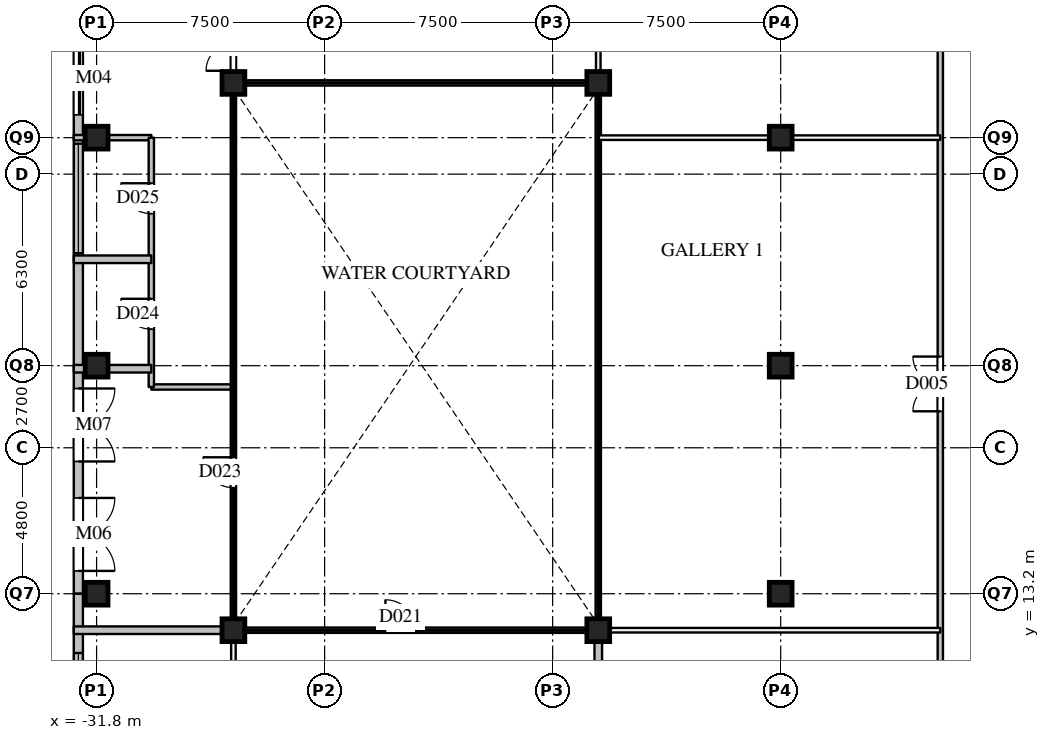
"""IFC4 building model, lengths in metres.
Left out: names, types, materials, properties, quantities, classifications, styles, units other than length and angle.
Written with IfcOpenShell. Run it as: python <this file> out.ifc"""

import sys

from ifc_helpers import new_model, si_unit, direction, frame, frame_2d, origin, origin_2d, place, context, subcontext, project, spatial, rectangle, extrude, element, fill, save


model = new_model("IFC4")
c1 = context("Model", 3, precision=1e-05, world=origin(), true_north=direction((0.0, 1.0)))
c2 = subcontext(c1, "Body", "Model", "MODEL_VIEW")
j1 = project(units=[si_unit("LENGTHUNIT", "METRE"), si_unit("PLANEANGLEUNIT", "RADIAN")], contexts=[c1])
p1 = place(None, origin())
s1 = spatial("IfcSite", under=j1, at=p1, CompositionType="ELEMENT")
p2 = place(p1, origin())
s2 = spatial("IfcBuilding", under=s1, at=p2, CompositionType="ELEMENT")
p3 = place(p2, origin())
s3 = spatial("IfcBuildingStorey", under=s2, at=p3, CompositionType="ELEMENT", Elevation=0.0)
for number, where, z_axis, x_axis in (
    (1, (-31.8, 13.2, 0.0), (0.0, 0.0, 1.0), (1.0, 0.0, 0.0)),
    (2, (-31.8, 20.7, 0.0), (0.0, 0.0, 1.0), (1.0, 0.0, 0.0)),
    (3, (-31.8, 28.2, 0.0), (0.0, 0.0, 1.0), (1.0, 0.0, 0.0)),
    (4, (-9.3, 13.2, 0.0), (0.0, 0.0, 1.0), (1.0, 0.0, 0.0)),
    (5, (-9.3, 20.7, 0.0), (0.0, 0.0, 1.0), (1.0, 0.0, 0.0)),
    (6, (-9.3, 28.2, 0.0), (0.0, 0.0, 1.0), (1.0, 0.0, 0.0)),
    (7, (-27.3, 12.0, 0.0), (0.0, 0.0, 1.0), (1.0, 0.0, 0.0)),
    (8, (-15.3, 12.0, 0.0), (0.0, 0.0, 1.0), (1.0, 0.0, 0.0)),
    (9, (-15.3, 30.0, 0.0), (0.0, 0.0, 1.0), (1.0, 0.0, 0.0)),
    (10, (-27.3, 30.0, 0.0), (0.0, 0.0, 1.0), (1.0, 0.0, 0.0)),
):
    element("IfcColumn", number, at=place(p3, frame(where, z_axis=z_axis, x_axis=x_axis)), inside=s3, PredefinedType="COLUMN", context=c2, shape_type="SweptSolid", body=[
        extrude(rectangle(XDim=0.75, YDim=0.75, at=origin_2d()), origin(), (0.0, 0.0, 1.0), 8.0),
    ])
p4 = place(p3, frame((-32.4, 35.7, 0.0), z_axis=(0.0, 0.0, 1.0), x_axis=(0.0, -1.0, 0.0)))
e11 = element("IfcWall", 11, at=p4, inside=s3, PredefinedType="SOLIDWALL", context=c2, shape_type="SweptSolid", body=[
    extrude(rectangle(XDim=7.5, YDim=0.3, at=frame_2d((3.75, 0.0))), origin(), (0.0, 0.0, 1.0), 7.59),
])
p5 = place(p4, frame((4.35, 0.0, 0.0)))
e12 = element("IfcOpeningElement", 12, at=p5, cuts=e11, PredefinedType="OPENING", context=c2, shape_type="SweptSolid", body=[
    extrude(rectangle(XDim=2.4, YDim=2.4, at=frame_2d((1.2, 1.2))), frame((0.0, 0.16, 0.0), z_axis=(0.0, -1.0, 0.0), x_axis=(1.0, 0.0, 0.0)), (0.0, 0.0, 1.0), 0.32),
])
p6 = place(p4, frame((0.75, 0.0, 0.0)))
e13 = element("IfcOpeningElement", 13, at=p6, cuts=e11, PredefinedType="OPENING", context=c2, shape_type="SweptSolid", body=[
    extrude(rectangle(XDim=2.4, YDim=2.4, at=frame_2d((1.2, 1.2))), frame((0.0, 0.16, 0.0), z_axis=(0.0, -1.0, 0.0), x_axis=(1.0, 0.0, 0.0)), (0.0, 0.0, 1.0), 0.32),
])
p7 = place(p3, frame((-32.4, 28.2, 0.0), z_axis=(0.0, 0.0, 1.0), x_axis=(0.0, -1.0, 0.0)))
e14 = element("IfcWall", 14, at=p7, inside=s3, PredefinedType="SOLIDWALL", context=c2, shape_type="SweptSolid", body=[
    extrude(rectangle(XDim=7.5, YDim=0.3, at=frame_2d((3.75, 0.0))), origin(), (0.0, 0.0, 1.0), 7.59),
])
p8 = place(p7, frame((0.2, 0.0, 0.9)))
e15 = element("IfcOpeningElement", 15, at=p8, cuts=e14, PredefinedType="OPENING", context=c2, shape_type="SweptSolid", body=[
    extrude(rectangle(XDim=3.6, YDim=3.0, at=frame_2d((1.8, 1.5))), frame((0.0, 0.16, 0.0), z_axis=(0.0, -1.0, 0.0), x_axis=(1.0, 0.0, 0.0)), (0.0, 0.0, 1.0), 0.32),
])
p9 = place(p3, frame((-32.4, 20.7, 0.0), z_axis=(0.0, 0.0, 1.0), x_axis=(0.0, -1.0, 0.0)))
e16 = element("IfcWall", 16, at=p9, inside=s3, PredefinedType="SOLIDWALL", context=c2, shape_type="SweptSolid", body=[
    extrude(rectangle(XDim=7.5, YDim=0.3, at=frame_2d((3.75, 0.0))), origin(), (0.0, 0.0, 1.0), 7.59),
])
p10 = place(p9, frame((4.35, 0.0, 0.0)))
e17 = element("IfcOpeningElement", 17, at=p10, cuts=e16, PredefinedType="OPENING", context=c2, shape_type="SweptSolid", body=[
    extrude(rectangle(XDim=2.4, YDim=2.7, at=frame_2d((1.2, 1.35))), frame((0.0, 0.16, 0.0), z_axis=(0.0, -1.0, 0.0), x_axis=(1.0, 0.0, 0.0)), (0.0, 0.0, 1.0), 0.32),
])
p11 = place(p9, frame((0.75, 0.0, 0.0)))
e18 = element("IfcOpeningElement", 18, at=p11, cuts=e16, PredefinedType="OPENING", context=c2, shape_type="SweptSolid", body=[
    extrude(rectangle(XDim=2.4, YDim=2.7, at=frame_2d((1.2, 1.35))), frame((0.0, 0.16, 0.0), z_axis=(0.0, -1.0, 0.0), x_axis=(1.0, 0.0, 0.0)), (0.0, 0.0, 1.0), 0.32),
])
p12 = place(p3, frame((-32.4, 13.2, 0.0), z_axis=(0.0, 0.0, 1.0), x_axis=(0.0, -1.0, 0.0)))
e19 = element("IfcWall", 19, at=p12, inside=s3, PredefinedType="SOLIDWALL", context=c2, shape_type="SweptSolid", body=[
    extrude(rectangle(XDim=7.5, YDim=0.3, at=frame_2d((3.75, 0.0))), origin(), (0.0, 0.0, 1.0), 7.59),
])
p13 = place(p12, frame((1.95, 0.0, 0.9)))
e20 = element("IfcOpeningElement", 20, at=p13, cuts=e19, PredefinedType="OPENING", context=c2, shape_type="SweptSolid", body=[
    extrude(rectangle(XDim=3.6, YDim=3.0, at=frame_2d((1.8, 1.5))), frame((0.0, 0.16, 0.0), z_axis=(0.0, -1.0, 0.0), x_axis=(1.0, 0.0, 0.0)), (0.0, 0.0, 1.0), 0.32),
])
p14 = place(p3, frame((-27.3, 12.0, 0.0), z_axis=(0.0, 0.0, 1.0), x_axis=(1.0, 0.0, 0.0)))
e21 = element("IfcWall", 21, at=p14, inside=s3, PredefinedType="PARTITIONING", context=c2, shape_type="SweptSolid", body=[
    extrude(rectangle(XDim=12.0, YDim=0.175, at=frame_2d((6.0, 0.0))), origin(), (0.0, 0.0, 1.0), 7.59),
])
p15 = place(p14, frame((5.0, 0.0, 0.0)))
e22 = element("IfcOpeningElement", 22, at=p15, cuts=e21, PredefinedType="OPENING", context=c2, shape_type="SweptSolid", body=[
    extrude(rectangle(XDim=1.0, YDim=2.1, at=frame_2d((0.5, 1.05))), frame((0.0, 0.097, 0.0), z_axis=(0.0, -1.0, 0.0), x_axis=(1.0, 0.0, 0.0)), (0.0, 0.0, 1.0), 0.195),
])
p16 = place(p3, frame((-30.0, 20.0, 0.0), z_axis=(0.0, 0.0, 1.0), x_axis=(1.0, 0.0, 0.0)))
e23 = element("IfcWall", 23, at=p16, inside=s3, PredefinedType="PARTITIONING", context=c2, shape_type="SweptSolid", body=[
    extrude(rectangle(XDim=2.7, YDim=0.175, at=frame_2d((1.35, 0.0))), origin(), (0.0, 0.0, 1.0), 7.59),
])
p17 = place(p3, frame((-32.55, 28.2, 0.0), z_axis=(0.0, 0.0, 1.0), x_axis=(1.0, 0.0, 0.0)))
e24 = element("IfcWall", 24, at=p17, inside=s3, PredefinedType="PARTITIONING", context=c2, shape_type="SweptSolid", body=[
    extrude(rectangle(XDim=2.55, YDim=0.175, at=frame_2d((1.275, 0.0))), origin(), (0.0, 0.0, 1.0), 7.59),
])
p18 = place(p3, frame((-27.3, 30.0, 0.0), z_axis=(0.0, 0.0, 1.0), x_axis=(1.0, 0.0, 0.0)))
e25 = element("IfcWall", 25, at=p18, inside=s3, PredefinedType="PARTITIONING", context=c2, shape_type="SweptSolid", body=[
    extrude(rectangle(XDim=12.0, YDim=0.175, at=frame_2d((6.0, 0.0))), origin(), (0.0, 0.0, 1.0), 7.59),
])
p19 = place(p3, frame((-30.0, 20.0, 0.0), z_axis=(0.0, 0.0, 1.0), x_axis=(0.0, 1.0, 0.0)))
e26 = element("IfcWall", 26, at=p19, inside=s3, PredefinedType="PARTITIONING", context=c2, shape_type="SweptSolid", body=[
    extrude(rectangle(XDim=8.2, YDim=0.175, at=frame_2d((4.1, 0.0))), origin(), (0.0, 0.0, 1.0), 7.59),
])
p20 = place(p19, frame((1.9, 0.0, 0.0)))
e27 = element("IfcOpeningElement", 27, at=p20, cuts=e26, PredefinedType="OPENING", context=c2, shape_type="SweptSolid", body=[
    extrude(rectangle(XDim=1.0, YDim=2.1, at=frame_2d((0.5, 1.05))), frame((0.0, 0.097, 0.0), z_axis=(0.0, -1.0, 0.0), x_axis=(1.0, 0.0, 0.0)), (0.0, 0.0, 1.0), 0.195),
])
p21 = place(p19, frame((5.7, 0.0, 0.0)))
e28 = element("IfcOpeningElement", 28, at=p21, cuts=e26, PredefinedType="OPENING", context=c2, shape_type="SweptSolid", body=[
    extrude(rectangle(XDim=1.0, YDim=2.1, at=frame_2d((0.5, 1.05))), frame((0.0, 0.097, 0.0), z_axis=(0.0, -1.0, 0.0), x_axis=(1.0, 0.0, 0.0)), (0.0, 0.0, 1.0), 0.195),
])
p22 = place(p3, frame((-27.3, 12.0, 0.0), z_axis=(0.0, 0.0, 1.0), x_axis=(0.0, 1.0, 0.0)))
e29 = element("IfcWall", 29, at=p22, inside=s3, PredefinedType="PARTITIONING", context=c2, shape_type="SweptSolid", body=[
    extrude(rectangle(XDim=35.35, YDim=0.175, at=frame_2d((17.675, 0.0))), origin(), (0.0, 0.0, 1.0), 6.79),
])
p23 = place(p22, frame((18.4, 0.0, 0.0)))
e30 = element("IfcOpeningElement", 30, at=p23, cuts=e29, PredefinedType="OPENING", context=c2, shape_type="SweptSolid", body=[
    extrude(rectangle(XDim=1.8, YDim=2.1, at=frame_2d((0.9, 1.05))), frame((0.0, 0.097, 0.0), z_axis=(0.0, -1.0, 0.0), x_axis=(1.0, 0.0, 0.0)), (0.0, 0.0, 1.0), 0.195),
])
p24 = place(p22, frame((23.7, 0.0, 0.0)))
e31 = element("IfcOpeningElement", 31, at=p24, cuts=e29, PredefinedType="OPENING", context=c2, shape_type="SweptSolid", body=[
    extrude(rectangle(XDim=1.8, YDim=2.1, at=frame_2d((0.9, 1.05))), frame((0.0, 0.097, 0.0), z_axis=(0.0, -1.0, 0.0), x_axis=(1.0, 0.0, 0.0)), (0.0, 0.0, 1.0), 0.195),
])
p25 = place(p22, frame((4.688, 0.0, 0.0)))
e32 = element("IfcOpeningElement", 32, at=p25, cuts=e29, PredefinedType="OPENING", context=c2, shape_type="SweptSolid", body=[
    extrude(rectangle(XDim=1.0, YDim=2.1, at=frame_2d((0.5, 1.05))), frame((0.0, 0.097, 0.0), z_axis=(0.0, -1.0, 0.0), x_axis=(1.0, 0.0, 0.0)), (0.0, 0.0, 1.0), 0.195),
])
p26 = place(p3, frame((-15.3, 12.0, 0.0), z_axis=(0.0, 0.0, 1.0), x_axis=(0.0, 1.0, 0.0)))
e33 = element("IfcWall", 33, at=p26, inside=s3, PredefinedType="PARTITIONING", context=c2, shape_type="SweptSolid", body=[
    extrude(rectangle(XDim=18.0, YDim=0.175, at=frame_2d((9.0, 0.0))), origin(), (0.0, 0.0, 1.0), 7.59),
])
p27 = place(p3, frame((-4.05, -4.05, 0.0), z_axis=(0.0, 0.0, 1.0), x_axis=(0.0, 1.0, 0.0)))
e34 = element("IfcWall", 34, at=p27, inside=s3, PredefinedType="PARTITIONING", context=c2, shape_type="SweptSolid", body=[
    extrude(rectangle(XDim=63.0, YDim=0.175, at=frame_2d((31.5, 0.0))), origin(), (0.0, 0.0, 1.0), 6.79),
])
p28 = place(p27, frame((51.535, 0.0, 0.0)))
e35 = element("IfcOpeningElement", 35, at=p28, cuts=e34, PredefinedType="OPENING", context=c2, shape_type="SweptSolid", body=[
    extrude(rectangle(XDim=1.8, YDim=2.1, at=frame_2d((0.9, 1.05))), frame((0.0, 0.097, 0.0), z_axis=(0.0, -1.0, 0.0), x_axis=(1.0, 0.0, 0.0)), (0.0, 0.0, 1.0), 0.195),
])
p29 = place(p27, frame((23.25, 0.0, 0.0)))
e36 = element("IfcOpeningElement", 36, at=p29, cuts=e34, PredefinedType="OPENING", context=c2, shape_type="SweptSolid", body=[
    extrude(rectangle(XDim=1.8, YDim=2.1, at=frame_2d((0.9, 1.05))), frame((0.0, 0.097, 0.0), z_axis=(0.0, -1.0, 0.0), x_axis=(1.0, 0.0, 0.0)), (0.0, 0.0, 1.0), 0.195),
])
p30 = place(p27, frame((38.85, 0.0, 0.0)))
e37 = element("IfcOpeningElement", 37, at=p30, cuts=e34, PredefinedType="OPENING", context=c2, shape_type="SweptSolid", body=[
    extrude(rectangle(XDim=1.8, YDim=2.1, at=frame_2d((0.9, 1.05))), frame((0.0, 0.097, 0.0), z_axis=(0.0, -1.0, 0.0), x_axis=(1.0, 0.0, 0.0)), (0.0, 0.0, 1.0), 0.195),
])
p31 = place(p27, frame((8.625, 0.0, 0.0)))
e38 = element("IfcOpeningElement", 38, at=p31, cuts=e34, PredefinedType="OPENING", context=c2, shape_type="SweptSolid", body=[
    extrude(rectangle(XDim=1.8, YDim=2.1, at=frame_2d((0.9, 1.05))), frame((0.0, 0.097, 0.0), z_axis=(0.0, -1.0, 0.0), x_axis=(1.0, 0.0, 0.0)), (0.0, 0.0, 1.0), 0.195),
])
for number, where, z_axis, x_axis in (
    (39, (-15.3, 12.0, 0.0), (0.0, 0.0, 1.0), (1.0, 0.0, 0.0)),
    (40, (-15.3, 28.2, 0.0), (0.0, 0.0, 1.0), (1.0, 0.0, 0.0)),
):
    element("IfcWall", number, at=place(p3, frame(where, z_axis=z_axis, x_axis=x_axis)), inside=s3, PredefinedType="PARTITIONING", context=c2, shape_type="SweptSolid", body=[
        extrude(rectangle(XDim=11.25, YDim=0.15, at=frame_2d((5.625, 0.0))), origin(), (0.0, 0.0, 1.0), 6.79),
    ])
p32 = place(p3, frame((-27.3, -9.3, 0.0), z_axis=(0.0, 0.0, 1.0), x_axis=(0.0, 1.0, 0.0)))
e41 = element("IfcWall", 41, at=p32, inside=s3, PredefinedType="PARTITIONING", context=c2, shape_type="SweptSolid", body=[
    extrude(rectangle(XDim=21.3, YDim=0.15, at=frame_2d((10.65, 0.0))), origin(), (0.0, 0.0, 1.0), 6.79),
])
p33 = place(p3, frame((-15.3, 30.0, 0.0), z_axis=(0.0, 0.0, 1.0), x_axis=(0.0, 1.0, 0.0)))
e42 = element("IfcWall", 42, at=p33, inside=s3, PredefinedType="PARTITIONING", context=c2, shape_type="SweptSolid", body=[
    extrude(rectangle(XDim=13.2, YDim=0.15, at=frame_2d((6.6, 0.0))), origin(), (0.0, 0.0, 1.0), 6.79),
])
p34 = place(p33, frame((3.52, 0.0, 0.0)))
e43 = element("IfcOpeningElement", 43, at=p34, cuts=e42, PredefinedType="OPENING", context=c2, shape_type="SweptSolid", body=[
    extrude(rectangle(XDim=1.8, YDim=2.1, at=frame_2d((0.9, 1.05))), frame((0.0, 0.085, 0.0), z_axis=(0.0, -1.0, 0.0), x_axis=(1.0, 0.0, 0.0)), (0.0, 0.0, 1.0), 0.17),
])
p35 = place(p3, frame((-32.55, 12.0, 0.0), z_axis=(0.0, 0.0, 1.0), x_axis=(1.0, 0.0, 0.0)))
e44 = element("IfcWall", 44, at=p35, inside=s3, PredefinedType="PARTITIONING", context=c2, shape_type="SweptSolid", body=[
    extrude(rectangle(XDim=5.25, YDim=0.25, at=frame_2d((2.625, 0.0))), origin(), (0.0, 0.0, 1.0), 6.79),
])
p36 = place(p3, frame((-32.55, 20.6, 0.0), z_axis=(0.0, 0.0, 1.0), x_axis=(1.0, 0.0, 0.0)))
e45 = element("IfcWall", 45, at=p36, inside=s3, PredefinedType="PARTITIONING", context=c2, shape_type="SweptSolid", body=[
    extrude(rectangle(XDim=2.55, YDim=0.25, at=frame_2d((1.275, 0.0))), origin(), (0.0, 0.0, 1.0), 7.59),
])
p37 = place(p3, frame((-32.55, 24.2, 0.0), z_axis=(0.0, 0.0, 1.0), x_axis=(1.0, 0.0, 0.0)))
e46 = element("IfcWall", 46, at=p37, inside=s3, PredefinedType="PARTITIONING", context=c2, shape_type="SweptSolid", body=[
    extrude(rectangle(XDim=2.55, YDim=0.25, at=frame_2d((1.275, 0.0))), origin(), (0.0, 0.0, 1.0), 6.79),
])
p38 = place(p3, frame((-15.3, -9.3, 0.0), z_axis=(0.0, 0.0, 1.0), x_axis=(0.0, 1.0, 0.0)))
e47 = element("IfcWall", 47, at=p38, inside=s3, PredefinedType="PARTITIONING", context=c2, shape_type="SweptSolid", body=[
    extrude(rectangle(XDim=21.3, YDim=0.25, at=frame_2d((10.65, 0.0))), origin(), (0.0, 0.0, 1.0), 6.79),
])
p39 = place(p5, origin())
e48 = element("IfcDoor", 48, at=p39, inside=s3, OperationType="SLIDING_TO_LEFT", PredefinedType="DOOR", context=c2, shape_type="SweptSolid", body=[
    extrude(rectangle(XDim=2.4, YDim=2.4, at=frame_2d((1.2, 1.2))), frame((0.0, 0.025, 0.0), z_axis=(0.0, -1.0, 0.0), x_axis=(1.0, 0.0, 0.0)), (0.0, 0.0, 1.0), 0.05),
])
fill(e12, e48)
p40 = place(p8, origin())
e49 = element("IfcWindow", 49, at=p40, inside=s3, PartitioningType="SINGLE_PANEL", PredefinedType="WINDOW", context=c2, shape_type="SweptSolid", body=[
    extrude(rectangle(XDim=3.6, YDim=3.0, at=frame_2d((1.8, 1.5))), frame((0.0, 0.03, 0.0), z_axis=(0.0, -1.0, 0.0), x_axis=(1.0, 0.0, 0.0)), (0.0, 0.0, 1.0), 0.06),
])
fill(e15, e49)
p41 = place(p10, origin())
e50 = element("IfcDoor", 50, at=p41, inside=s3, OperationType="DOUBLE_DOOR_SINGLE_SWING", PredefinedType="DOOR", context=c2, shape_type="SweptSolid", body=[
    extrude(rectangle(XDim=2.4, YDim=2.7, at=frame_2d((1.2, 1.35))), frame((0.0, 0.025, 0.0), z_axis=(0.0, -1.0, 0.0), x_axis=(1.0, 0.0, 0.0)), (0.0, 0.0, 1.0), 0.05),
])
fill(e17, e50)
p42 = place(p11, origin())
e51 = element("IfcDoor", 51, at=p42, inside=s3, OperationType="DOUBLE_DOOR_SINGLE_SWING", PredefinedType="DOOR", context=c2, shape_type="SweptSolid", body=[
    extrude(rectangle(XDim=2.4, YDim=2.7, at=frame_2d((1.2, 1.35))), frame((0.0, 0.025, 0.0), z_axis=(0.0, -1.0, 0.0), x_axis=(1.0, 0.0, 0.0)), (0.0, 0.0, 1.0), 0.05),
])
fill(e18, e51)
p43 = place(p13, origin())
e52 = element("IfcWindow", 52, at=p43, inside=s3, PartitioningType="SINGLE_PANEL", PredefinedType="WINDOW", context=c2, shape_type="SweptSolid", body=[
    extrude(rectangle(XDim=3.6, YDim=3.0, at=frame_2d((1.8, 1.5))), frame((0.0, 0.03, 0.0), z_axis=(0.0, -1.0, 0.0), x_axis=(1.0, 0.0, 0.0)), (0.0, 0.0, 1.0), 0.06),
])
fill(e20, e52)
p44 = place(p23, origin())
e53 = element("IfcDoor", 53, at=p44, inside=s3, OperationType="DOUBLE_DOOR_SINGLE_SWING", PredefinedType="DOOR", context=c2, shape_type="SweptSolid", body=[
    extrude(rectangle(XDim=1.8, YDim=2.1, at=frame_2d((0.9, 1.05))), frame((0.0, 0.025, 0.0), z_axis=(0.0, -1.0, 0.0), x_axis=(1.0, 0.0, 0.0)), (0.0, 0.0, 1.0), 0.05),
])
fill(e30, e53)
p45 = place(p29, origin())
e54 = element("IfcDoor", 54, at=p45, inside=s3, OperationType="DOUBLE_DOOR_SINGLE_SWING", PredefinedType="DOOR", context=c2, shape_type="SweptSolid", body=[
    extrude(rectangle(XDim=1.8, YDim=2.1, at=frame_2d((0.9, 1.05))), frame((0.0, 0.025, 0.0), z_axis=(0.0, -1.0, 0.0), x_axis=(1.0, 0.0, 0.0)), (0.0, 0.0, 1.0), 0.05),
])
fill(e36, e54)
p46 = place(p15, origin())
e55 = element("IfcDoor", 55, at=p46, inside=s3, OperationType="SINGLE_SWING_LEFT", PredefinedType="DOOR", context=c2, shape_type="SweptSolid", body=[
    extrude(rectangle(XDim=1.0, YDim=2.1, at=frame_2d((0.5, 1.05))), frame((0.0, 0.025, 0.0), z_axis=(0.0, -1.0, 0.0), x_axis=(1.0, 0.0, 0.0)), (0.0, 0.0, 1.0), 0.05),
])
fill(e22, e55)
p47 = place(p25, origin())
e56 = element("IfcDoor", 56, at=p47, inside=s3, OperationType="SINGLE_SWING_RIGHT", PredefinedType="DOOR", context=c2, shape_type="SweptSolid", body=[
    extrude(rectangle(XDim=1.0, YDim=2.1, at=frame_2d((0.5, 1.05))), frame((0.0, 0.025, 0.0), z_axis=(0.0, -1.0, 0.0), x_axis=(1.0, 0.0, 0.0)), (0.0, 0.0, 1.0), 0.05),
])
fill(e32, e56)
p48 = place(p20, origin())
e57 = element("IfcDoor", 57, at=p48, inside=s3, OperationType="SINGLE_SWING_RIGHT", PredefinedType="DOOR", context=c2, shape_type="SweptSolid", body=[
    extrude(rectangle(XDim=1.0, YDim=2.1, at=frame_2d((0.5, 1.05))), frame((0.0, 0.025, 0.0), z_axis=(0.0, -1.0, 0.0), x_axis=(1.0, 0.0, 0.0)), (0.0, 0.0, 1.0), 0.05),
])
fill(e27, e57)
p49 = place(p21, origin())
e58 = element("IfcDoor", 58, at=p49, inside=s3, OperationType="SINGLE_SWING_RIGHT", PredefinedType="DOOR", context=c2, shape_type="SweptSolid", body=[
    extrude(rectangle(XDim=1.0, YDim=2.1, at=frame_2d((0.5, 1.05))), frame((0.0, 0.025, 0.0), z_axis=(0.0, -1.0, 0.0), x_axis=(1.0, 0.0, 0.0)), (0.0, 0.0, 1.0), 0.05),
])
fill(e28, e58)
save(model, sys.argv[1])
